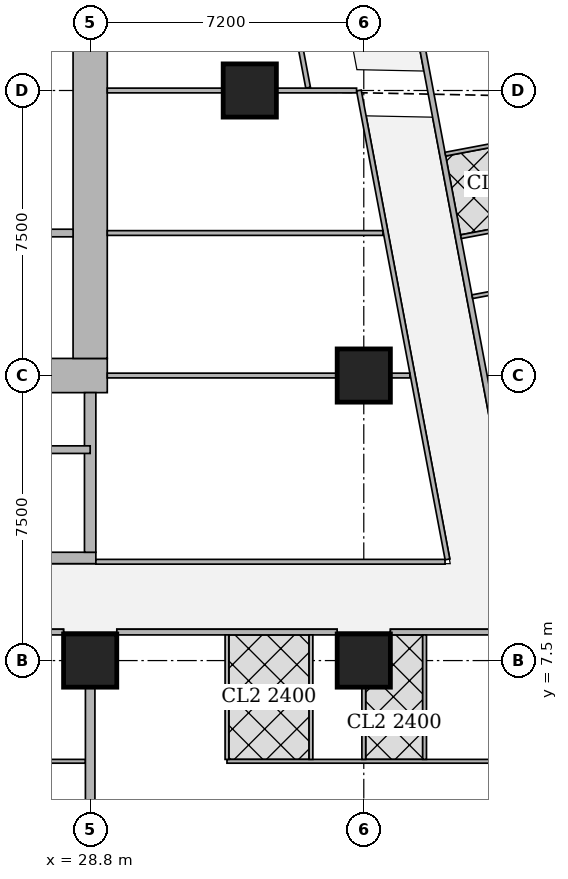
"""IFC4 building model, lengths in metres.
Left out: names, types, materials, properties, quantities, classifications, styles, units other than length and angle.
Written with IfcOpenShell. Run it as: python <this file> out.ifc"""

import sys

from ifc_helpers import new_model, si_unit, direction, frame, frame_2d, origin, origin_2d, place, context, subcontext, project, spatial, rectangle, extrude, element, fill, save


model = new_model("IFC4")
c1 = context("Model", 3, precision=1e-05, world=origin(), true_north=direction((0.0, 1.0)))
c2 = subcontext(c1, "Body", "Model", "MODEL_VIEW")
j1 = project(units=[si_unit("LENGTHUNIT", "METRE"), si_unit("PLANEANGLEUNIT", "RADIAN")], contexts=[c1])
p1 = place(None, origin())
s1 = spatial("IfcSite", under=j1, at=p1, CompositionType="ELEMENT")
p2 = place(p1, origin())
s2 = spatial("IfcBuilding", under=s1, at=p2, CompositionType="ELEMENT")
p3 = place(p2, frame((0.0, 0.0, 193.7)))
s3 = spatial("IfcBuildingStorey", under=s2, at=p3, CompositionType="ELEMENT", Elevation=193.7)
for number, where, z_axis, x_axis in (
    (1, (28.8, 7.5, 0.0), (0.0, 0.0, 1.0), (1.0, 0.0, 0.0)),
    (2, (36.0, 7.5, 0.0), (0.0, 0.0, 1.0), (1.0, 0.0, 0.0)),
    (3, (36.0, 15.0, 0.0), (0.0, 0.0, 1.0), (1.0, 0.0, 0.0)),
    (4, (33.0, 22.5, 0.0), (0.0, 0.0, 1.0), (1.0, 0.0, 0.0)),
):
    element("IfcColumn", number, at=place(p3, frame(where, z_axis=z_axis, x_axis=x_axis)), inside=s3, PredefinedType="COLUMN", context=c2, shape_type="SweptSolid", body=[
        extrude(rectangle(XDim=1.4, YDim=1.4, at=origin_2d()), origin(), (0.0, 0.0, 1.0), 3.75),
    ])
p4 = place(p3, frame((13.95, 15.0, 0.0), z_axis=(0.0, 0.0, 1.0), x_axis=(1.0, 0.0, 0.0)))
e5 = element("IfcWall", 5, at=p4, inside=s3, PredefinedType="SHEAR", context=c2, shape_type="SweptSolid", body=[
    extrude(rectangle(XDim=15.3, YDim=0.9, at=frame_2d((7.65, 0.0))), origin(), (0.0, 0.0, 1.0), 3.75),
])
p5 = place(p4, frame((4.45, 0.0, 0.0)))
e6 = element("IfcOpeningElement", 6, at=p5, cuts=e5, PredefinedType="OPENING", context=c2, shape_type="SweptSolid", body=[
    extrude(rectangle(XDim=1.8, YDim=2.1, at=frame_2d((0.9, 1.05))), frame((0.0, 0.46, 0.0), z_axis=(0.0, -1.0, 0.0), x_axis=(1.0, 0.0, 0.0)), (0.0, 0.0, 1.0), 0.92),
])
p6 = place(p4, frame((10.7, 0.0, 0.0)))
e7 = element("IfcOpeningElement", 7, at=p6, cuts=e5, PredefinedType="OPENING", context=c2, shape_type="SweptSolid", body=[
    extrude(rectangle(XDim=1.1, YDim=2.1, at=frame_2d((0.55, 1.05))), frame((0.0, 0.46, 0.0), z_axis=(0.0, -1.0, 0.0), x_axis=(1.0, 0.0, 0.0)), (0.0, 0.0, 1.0), 0.92),
])
p7 = place(p3, frame((28.8, 15.45, 0.0), z_axis=(0.0, 0.0, 1.0), x_axis=(0.0, 1.0, 0.0)))
e8 = element("IfcWall", 8, at=p7, inside=s3, PredefinedType="SHEAR", context=c2, shape_type="SweptSolid", body=[
    extrude(rectangle(XDim=14.1, YDim=0.9, at=frame_2d((7.05, 0.0))), origin(), (0.0, 0.0, 1.0), 3.75),
])
p8 = place(p3, frame((21.45, 10.2, 0.0), z_axis=(0.0, 0.0, 1.0), x_axis=(1.0, 0.0, 0.0)))
e9 = element("IfcWall", 9, at=p8, inside=s3, PredefinedType="SHEAR", context=c2, shape_type="SweptSolid", body=[
    extrude(rectangle(XDim=7.5, YDim=0.3, at=frame_2d((3.75, 0.0))), origin(), (0.0, 0.0, 1.0), 3.75),
])
p9 = place(p8, frame((0.5, 0.0, 0.0)))
e10 = element("IfcOpeningElement", 10, at=p9, cuts=e9, PredefinedType="OPENING", context=c2, shape_type="SweptSolid", body=[
    extrude(rectangle(XDim=1.1, YDim=2.1, at=frame_2d((0.55, 1.05))), frame((0.0, 0.16, 0.0), z_axis=(0.0, -1.0, 0.0), x_axis=(1.0, 0.0, 0.0)), (0.0, 0.0, 1.0), 0.32),
])
p10 = place(p3, frame((28.8, 10.35, 0.0), z_axis=(0.0, 0.0, 1.0), x_axis=(0.0, 1.0, 0.0)))
e11 = element("IfcWall", 11, at=p10, inside=s3, PredefinedType="SHEAR", context=c2, shape_type="SweptSolid", body=[
    extrude(rectangle(XDim=4.2, YDim=0.3, at=frame_2d((2.1, 0.0))), origin(), (0.0, 0.0, 1.0), 3.75),
])
p11 = place(p3, frame((40.355, 8.25, 0.0), z_axis=(0.0, 0.0, 1.0), x_axis=(-1.0, 0.0, 0.0)))
e12 = element("IfcWall", 12, at=p11, inside=s3, PredefinedType="SOLIDWALL", context=c2, shape_type="SweptSolid", body=[
    extrude(rectangle(XDim=3.654, YDim=0.15, at=frame_2d((1.827, 0.0))), origin(), (0.0, 0.0, 1.0), 3.5),
])
p12 = place(p3, frame((35.299, 8.25, 0.0), z_axis=(0.0, 0.0, 1.0), x_axis=(-1.0, 0.0, 0.0)))
e13 = element("IfcWall", 13, at=p12, inside=s3, PredefinedType="SOLIDWALL", context=c2, shape_type="SweptSolid", body=[
    extrude(rectangle(XDim=5.798, YDim=0.15, at=frame_2d((2.899, 0.0))), origin(), (0.0, 0.0, 1.0), 3.5),
])
p13 = place(p12, frame((3.999, 0.0, 0.0)))
e14 = element("IfcOpeningElement", 14, at=p13, cuts=e13, PredefinedType="OPENING", context=c2, shape_type="SweptSolid", body=[
    extrude(rectangle(XDim=1.0, YDim=2.1, at=frame_2d((0.5, 1.05))), frame((0.0, 0.085, 0.0), z_axis=(0.0, -1.0, 0.0), x_axis=(1.0, 0.0, 0.0)), (0.0, 0.0, 1.0), 0.17),
])
p14 = place(p3, frame((28.099, 8.25, 0.0), z_axis=(0.0, 0.0, 1.0), x_axis=(-1.0, 0.0, 0.0)))
e15 = element("IfcWall", 15, at=p14, inside=s3, PredefinedType="SOLIDWALL", context=c2, shape_type="SweptSolid", body=[
    extrude(rectangle(XDim=5.798, YDim=0.15, at=frame_2d((2.899, 0.0))), origin(), (0.0, 0.0, 1.0), 3.5),
])
p15 = place(p3, frame((33.933, 42.73, 0.0), z_axis=(0.0, 0.0, 1.0), x_axis=(0.185595417643, -0.982626246825, 0.0)))
e16 = element("IfcWall", 16, at=p15, inside=s3, PredefinedType="SOLIDWALL", context=c2, shape_type="SweptSolid", body=[
    extrude(rectangle(XDim=41.051, YDim=0.15, at=frame_2d((20.525, 0.0))), origin(), (0.0, 0.0, 1.0), 2.5),
])
p16 = place(p15, frame((16.082, 0.0, 0.0)))
e17 = element("IfcOpeningElement", 17, at=p16, cuts=e16, PredefinedType="OPENING", context=c2, shape_type="SweptSolid", body=[
    extrude(rectangle(XDim=1.0, YDim=2.1, at=frame_2d((0.5, 1.05))), frame((0.0, 0.085, 0.0), z_axis=(0.0, -1.0, 0.0), x_axis=(1.0, 0.0, 0.0)), (0.0, 0.0, 1.0), 0.17),
])
p17 = place(p15, frame((19.898, 0.0, 0.0)))
e18 = element("IfcOpeningElement", 18, at=p17, cuts=e16, PredefinedType="OPENING", context=c2, shape_type="SweptSolid", body=[
    extrude(rectangle(XDim=1.0, YDim=2.1, at=frame_2d((0.5, 1.05))), frame((0.0, 0.085, 0.0), z_axis=(0.0, -1.0, 0.0), x_axis=(1.0, 0.0, 0.0)), (0.0, 0.0, 1.0), 0.17),
])
p18 = place(p15, frame((30.862, 0.0, 0.0)))
e19 = element("IfcOpeningElement", 19, at=p18, cuts=e16, PredefinedType="OPENING", context=c2, shape_type="SweptSolid", body=[
    extrude(rectangle(XDim=1.0, YDim=2.1, at=frame_2d((0.5, 1.05))), frame((0.0, 0.085, 0.0), z_axis=(0.0, -1.0, 0.0), x_axis=(1.0, 0.0, 0.0)), (0.0, 0.0, 1.0), 0.17),
])
p19 = place(p3, frame((28.675, 4.85, 0.0), z_axis=(0.0, 0.0, 1.0), x_axis=(-1.0, 0.0, 0.0)))
e20 = element("IfcWall", 20, at=p19, inside=s3, PredefinedType="PARTITIONING", context=c2, shape_type="SweptSolid", body=[
    extrude(rectangle(XDim=10.675, YDim=0.1, at=frame_2d((5.337, 0.0))), origin(), (0.0, 0.0, 1.0), 3.5),
])
p20 = place(p19, frame((9.12, 0.0, 0.0)))
e21 = element("IfcOpeningElement", 21, at=p20, cuts=e20, PredefinedType="OPENING", context=c2, shape_type="SweptSolid", body=[
    extrude(rectangle(XDim=0.9, YDim=2.1, at=frame_2d((0.45, 1.05))), frame((0.0, 0.06, 0.0), z_axis=(0.0, -1.0, 0.0), x_axis=(1.0, 0.0, 0.0)), (0.0, 0.0, 1.0), 0.12),
])
p21 = place(p19, frame((5.825, 0.0, 0.0)))
e22 = element("IfcOpeningElement", 22, at=p21, cuts=e20, PredefinedType="OPENING", context=c2, shape_type="SweptSolid", body=[
    extrude(rectangle(XDim=0.9, YDim=2.1, at=frame_2d((0.45, 1.05))), frame((0.0, 0.06, 0.0), z_axis=(0.0, -1.0, 0.0), x_axis=(1.0, 0.0, 0.0)), (0.0, 0.0, 1.0), 0.12),
])
p22 = place(p19, frame((2.115, 0.0, 0.0)))
e23 = element("IfcOpeningElement", 23, at=p22, cuts=e20, PredefinedType="OPENING", context=c2, shape_type="SweptSolid", body=[
    extrude(rectangle(XDim=0.9, YDim=2.1, at=frame_2d((0.45, 1.05))), frame((0.0, 0.06, 0.0), z_axis=(0.0, -1.0, 0.0), x_axis=(1.0, 0.0, 0.0)), (0.0, 0.0, 1.0), 0.12),
])
p23 = place(p19, frame((7.32, 0.0, 0.0)))
e24 = element("IfcOpeningElement", 24, at=p23, cuts=e20, PredefinedType="OPENING", context=c2, shape_type="SweptSolid", body=[
    extrude(rectangle(XDim=0.9, YDim=2.1, at=frame_2d((0.45, 1.05))), frame((0.0, 0.06, 0.0), z_axis=(0.0, -1.0, 0.0), x_axis=(1.0, 0.0, 0.0)), (0.0, 0.0, 1.0), 0.12),
])
p24 = place(p19, frame((4.025, 0.0, 0.0)))
e25 = element("IfcOpeningElement", 25, at=p24, cuts=e20, PredefinedType="OPENING", context=c2, shape_type="SweptSolid", body=[
    extrude(rectangle(XDim=0.9, YDim=2.1, at=frame_2d((0.45, 1.05))), frame((0.0, 0.06, 0.0), z_axis=(0.0, -1.0, 0.0), x_axis=(1.0, 0.0, 0.0)), (0.0, 0.0, 1.0), 0.12),
])
p25 = place(p19, frame((0.315, 0.0, 0.0)))
e26 = element("IfcOpeningElement", 26, at=p25, cuts=e20, PredefinedType="OPENING", context=c2, shape_type="SweptSolid", body=[
    extrude(rectangle(XDim=0.9, YDim=2.1, at=frame_2d((0.45, 1.05))), frame((0.0, 0.06, 0.0), z_axis=(0.0, -1.0, 0.0), x_axis=(1.0, 0.0, 0.0)), (0.0, 0.0, 1.0), 0.12),
])
p26 = place(p3, frame((41.002, 4.85, 0.0), z_axis=(0.0, 0.0, 1.0), x_axis=(-1.0, 0.0, 0.0)))
e27 = element("IfcWall", 27, at=p26, inside=s3, PredefinedType="PARTITIONING", context=c2, shape_type="SweptSolid", body=[
    extrude(rectangle(XDim=8.602, YDim=0.1, at=frame_2d((4.301, 0.0))), origin(), (0.0, 0.0, 1.0), 3.5),
])
p27 = place(p26, frame((7.047, 0.0, 0.0)))
e28 = element("IfcOpeningElement", 28, at=p27, cuts=e27, PredefinedType="OPENING", context=c2, shape_type="SweptSolid", body=[
    extrude(rectangle(XDim=0.9, YDim=2.1, at=frame_2d((0.45, 1.05))), frame((0.0, 0.06, 0.0), z_axis=(0.0, -1.0, 0.0), x_axis=(1.0, 0.0, 0.0)), (0.0, 0.0, 1.0), 0.12),
])
p28 = place(p26, frame((3.752, 0.0, 0.0)))
e29 = element("IfcOpeningElement", 29, at=p28, cuts=e27, PredefinedType="OPENING", context=c2, shape_type="SweptSolid", body=[
    extrude(rectangle(XDim=0.9, YDim=2.1, at=frame_2d((0.45, 1.05))), frame((0.0, 0.06, 0.0), z_axis=(0.0, -1.0, 0.0), x_axis=(1.0, 0.0, 0.0)), (0.0, 0.0, 1.0), 0.12),
])
p29 = place(p26, frame((0.15, 0.0, 0.0)))
e30 = element("IfcOpeningElement", 30, at=p29, cuts=e27, PredefinedType="OPENING", context=c2, shape_type="SweptSolid", body=[
    extrude(rectangle(XDim=0.9, YDim=2.1, at=frame_2d((0.45, 1.05))), frame((0.0, 0.06, 0.0), z_axis=(0.0, -1.0, 0.0), x_axis=(1.0, 0.0, 0.0)), (0.0, 0.0, 1.0), 0.12),
])
p30 = place(p26, frame((5.247, 0.0, 0.0)))
e31 = element("IfcOpeningElement", 31, at=p30, cuts=e27, PredefinedType="OPENING", context=c2, shape_type="SweptSolid", body=[
    extrude(rectangle(XDim=0.9, YDim=2.1, at=frame_2d((0.45, 1.05))), frame((0.0, 0.06, 0.0), z_axis=(0.0, -1.0, 0.0), x_axis=(1.0, 0.0, 0.0)), (0.0, 0.0, 1.0), 0.12),
])
p31 = place(p26, frame((1.952, 0.0, 0.0)))
e32 = element("IfcOpeningElement", 32, at=p31, cuts=e27, PredefinedType="OPENING", context=c2, shape_type="SweptSolid", body=[
    extrude(rectangle(XDim=0.9, YDim=2.1, at=frame_2d((0.45, 1.05))), frame((0.0, 0.06, 0.0), z_axis=(0.0, -1.0, 0.0), x_axis=(1.0, 0.0, 0.0)), (0.0, 0.0, 1.0), 0.12),
])
p32 = place(p3, frame((32.4, 4.9, 0.0), z_axis=(0.0, 0.0, 1.0), x_axis=(0.0, 1.0, 0.0)))
e33 = element("IfcWall", 33, at=p32, inside=s3, PredefinedType="PARTITIONING", context=c2, shape_type="SweptSolid", body=[
    extrude(rectangle(XDim=3.275, YDim=0.1, at=frame_2d((1.638, 0.0))), origin(), (0.0, 0.0, 1.0), 3.5),
])
p33 = place(p3, frame((36.0, 4.9, 0.0), z_axis=(0.0, 0.0, 1.0), x_axis=(0.0, 1.0, 0.0)))
e34 = element("IfcWall", 34, at=p33, inside=s3, PredefinedType="PARTITIONING", context=c2, shape_type="SweptSolid", body=[
    extrude(rectangle(XDim=1.899, YDim=0.1, at=frame_2d((0.95, 0.0))), origin(), (0.0, 0.0, 1.0), 3.5),
])
for number, where, z_axis, x_axis in (
    (35, (34.61, 4.9, 0.0), (0.0, 0.0, 1.0), (0.0, 1.0, 0.0)),
    (36, (37.6, 4.9, 0.0), (0.0, 0.0, 1.0), (0.0, 1.0, 0.0)),
):
    element("IfcWall", number, at=place(p3, frame(where, z_axis=z_axis, x_axis=x_axis)), inside=s3, PredefinedType="PARTITIONING", context=c2, shape_type="SweptSolid", body=[
        extrude(rectangle(XDim=3.275, YDim=0.1, at=frame_2d((1.638, 0.0))), origin(), (0.0, 0.0, 1.0), 3.5),
    ])
p34 = place(p3, frame((28.8, 3.65, 0.0), z_axis=(0.0, 0.0, 1.0), x_axis=(0.0, 1.0, 0.0)))
e37 = element("IfcWall", 37, at=p34, inside=s3, PredefinedType="SOLIDWALL", context=c2, shape_type="SweptSolid", body=[
    extrude(rectangle(XDim=3.149, YDim=0.25, at=frame_2d((1.575, 0.0))), origin(), (0.0, 0.0, 1.0), 3.5),
])
p35 = place(p3, frame((41.365, 21.433, 0.0), z_axis=(0.0, 0.0, 1.0), x_axis=(-0.982607026909, -0.185697147715, 0.0)))
e38 = element("IfcWall", 38, at=p35, inside=s3, PredefinedType="PARTITIONING", context=c2, shape_type="SweptSolid", body=[
    extrude(rectangle(XDim=3.275, YDim=0.1, at=frame_2d((1.637, 0.0))), origin(), (0.0, 0.0, 1.0), 3.5),
])
p36 = place(p3, frame((42.073, 17.682, 0.0), z_axis=(0.0, 0.0, 1.0), x_axis=(-0.982620626894, -0.185625169636, 0.0)))
e39 = element("IfcWall", 39, at=p36, inside=s3, PredefinedType="PARTITIONING", context=c2, shape_type="SweptSolid", body=[
    extrude(rectangle(XDim=3.275, YDim=0.1, at=frame_2d((1.637, 0.0))), origin(), (0.0, 0.0, 1.0), 3.5),
])
p37 = place(p36, frame((1.2, 0.0, 0.0)))
e40 = element("IfcOpeningElement", 40, at=p37, cuts=e39, PredefinedType="OPENING", context=c2, shape_type="SweptSolid", body=[
    extrude(rectangle(XDim=0.9, YDim=2.1, at=frame_2d((0.45, 1.05))), frame((0.0, 0.06, 0.0), z_axis=(0.0, -1.0, 0.0), x_axis=(1.0, 0.0, 0.0)), (0.0, 0.0, 1.0), 0.12),
])
p38 = place(p3, frame((41.775, 19.261, 0.0), z_axis=(0.0, 0.0, 1.0), x_axis=(-0.982620626894, -0.185625169636, 0.0)))
e41 = element("IfcWall", 41, at=p38, inside=s3, PredefinedType="PARTITIONING", context=c2, shape_type="SweptSolid", body=[
    extrude(rectangle(XDim=3.275, YDim=0.1, at=frame_2d((1.637, 0.0))), origin(), (0.0, 0.0, 1.0), 3.5),
])
p39 = place(p3, frame((28.95, 10.1, 0.0), z_axis=(0.0, 0.0, 1.0), x_axis=(1.0, 0.0, 0.0)))
e42 = element("IfcWall", 42, at=p39, inside=s3, PredefinedType="PARTITIONING", context=c2, shape_type="SweptSolid", body=[
    extrude(rectangle(XDim=9.188, YDim=0.125, at=frame_2d((4.594, 0.0))), origin(), (0.0, 0.0, 1.0), 3.5),
])
p40 = place(p3, frame((38.202, 10.163, 0.0), z_axis=(0.0, 0.0, 1.0), x_axis=(-0.185645577403, 0.982616771479, 0.0)))
e43 = element("IfcWall", 43, at=p40, inside=s3, PredefinedType="PARTITIONING", context=c2, shape_type="SweptSolid", body=[
    extrude(rectangle(XDim=12.555, YDim=0.125, at=frame_2d((6.278, 0.0))), origin(), (0.0, 0.0, 1.0), 2.5),
])
p41 = place(p40, frame((0.708, 0.0, 0.0)))
e44 = element("IfcOpeningElement", 44, at=p41, cuts=e43, PredefinedType="OPENING", context=c2, shape_type="SweptSolid", body=[
    extrude(rectangle(XDim=1.0, YDim=2.1, at=frame_2d((0.5, 1.05))), frame((0.0, 0.073, 0.0), z_axis=(0.0, -1.0, 0.0), x_axis=(1.0, 0.0, 0.0)), (0.0, 0.0, 1.0), 0.145),
])
p42 = place(p40, frame((5.9, 0.0, 0.0)))
e45 = element("IfcOpeningElement", 45, at=p42, cuts=e43, PredefinedType="OPENING", context=c2, shape_type="SweptSolid", body=[
    extrude(rectangle(XDim=1.0, YDim=2.1, at=frame_2d((0.5, 1.05))), frame((0.0, 0.073, 0.0), z_axis=(0.0, -1.0, 0.0), x_axis=(1.0, 0.0, 0.0)), (0.0, 0.0, 1.0), 0.145),
])
p43 = place(p40, frame((9.562, 0.0, 0.0)))
e46 = element("IfcOpeningElement", 46, at=p43, cuts=e43, PredefinedType="OPENING", context=c2, shape_type="SweptSolid", body=[
    extrude(rectangle(XDim=1.0, YDim=2.1, at=frame_2d((0.5, 1.05))), frame((0.0, 0.073, 0.0), z_axis=(0.0, -1.0, 0.0), x_axis=(1.0, 0.0, 0.0)), (0.0, 0.0, 1.0), 0.145),
])
p44 = place(p3, frame((34.535, 22.574, 0.0), z_axis=(0.0, 0.0, 1.0), x_axis=(-0.185576487128, 0.982629822174, 0.0)))
e47 = element("IfcWall", 47, at=p44, inside=s3, PredefinedType="PARTITIONING", context=c2, shape_type="SweptSolid", body=[
    extrude(rectangle(XDim=6.832, YDim=0.125, at=frame_2d((3.416, 0.0))), origin(), (0.0, 0.0, 1.0), 2.5),
])
p45 = place(p44, frame((3.241, 0.0, 0.0)))
e48 = element("IfcOpeningElement", 48, at=p45, cuts=e47, PredefinedType="OPENING", context=c2, shape_type="SweptSolid", body=[
    extrude(rectangle(XDim=1.0, YDim=2.1, at=frame_2d((0.5, 1.05))), frame((0.0, 0.073, 0.0), z_axis=(0.0, -1.0, 0.0), x_axis=(1.0, 0.0, 0.0)), (0.0, 0.0, 1.0), 0.145),
])
p46 = place(p3, frame((29.25, 15.0, 0.0), z_axis=(0.0, 0.0, 1.0), x_axis=(1.0, 0.0, 0.0)))
e49 = element("IfcWall", 49, at=p46, inside=s3, PredefinedType="PARTITIONING", context=c2, shape_type="SweptSolid", body=[
    extrude(rectangle(XDim=6.049, YDim=0.125, at=frame_2d((3.024, 0.0))), origin(), (0.0, 0.0, 1.0), 3.5),
])
p47 = place(p3, frame((36.701, 15.0, 0.0), z_axis=(0.0, 0.0, 1.0), x_axis=(1.0, 0.0, 0.0)))
e50 = element("IfcWall", 50, at=p47, inside=s3, PredefinedType="PARTITIONING", context=c2, shape_type="SweptSolid", body=[
    extrude(rectangle(XDim=0.512, YDim=0.125, at=frame_2d((0.256, 0.0))), origin(), (0.0, 0.0, 1.0), 3.5),
])
p48 = place(p3, frame((29.25, 18.75, 0.0), z_axis=(0.0, 0.0, 1.0), x_axis=(1.0, 0.0, 0.0)))
e51 = element("IfcWall", 51, at=p48, inside=s3, PredefinedType="PARTITIONING", context=c2, shape_type="SweptSolid", body=[
    extrude(rectangle(XDim=7.254, YDim=0.125, at=frame_2d((3.627, 0.0))), origin(), (0.0, 0.0, 1.0), 3.5),
])
p49 = place(p3, frame((29.25, 22.5, 0.0), z_axis=(0.0, 0.0, 1.0), x_axis=(1.0, 0.0, 0.0)))
e52 = element("IfcWall", 52, at=p49, inside=s3, PredefinedType="PARTITIONING", context=c2, shape_type="SweptSolid", body=[
    extrude(rectangle(XDim=3.049, YDim=0.125, at=frame_2d((1.524, 0.0))), origin(), (0.0, 0.0, 1.0), 3.5),
])
p50 = place(p3, frame((33.701, 22.5, 0.0), z_axis=(0.0, 0.0, 1.0), x_axis=(1.0, 0.0, 0.0)))
e53 = element("IfcWall", 53, at=p50, inside=s3, PredefinedType="PARTITIONING", context=c2, shape_type="SweptSolid", body=[
    extrude(rectangle(XDim=2.109, YDim=0.125, at=frame_2d((1.055, 0.0))), origin(), (0.0, 0.0, 1.0), 2.5),
])
p51 = place(p3, frame((23.0, 13.05, 0.0), z_axis=(0.0, 0.0, 1.0), x_axis=(1.0, 0.0, 0.0)))
e54 = element("IfcWall", 54, at=p51, inside=s3, PredefinedType="SHEAR", context=c2, shape_type="SweptSolid", body=[
    extrude(rectangle(XDim=5.8, YDim=0.2, at=frame_2d((2.9, 0.0))), origin(), (0.0, 0.0, 1.0), 3.75),
])
p52 = place(p3, frame((27.4, 18.75, 0.0), z_axis=(0.0, 0.0, 1.0), x_axis=(1.0, 0.0, 0.0)))
e55 = element("IfcWall", 55, at=p52, inside=s3, PredefinedType="SOLIDWALL", context=c2, shape_type="SweptSolid", body=[
    extrude(rectangle(XDim=0.95, YDim=0.2, at=frame_2d((0.475, 0.0))), origin(), (0.0, 0.0, 1.0), 3.5),
])
p53 = place(p25, origin())
e56 = element("IfcDoor", 56, at=p53, inside=s3, OperationType="SINGLE_SWING_RIGHT", PredefinedType="DOOR", context=c2, shape_type="SweptSolid", body=[
    extrude(rectangle(XDim=0.9, YDim=2.1, at=frame_2d((0.45, 1.05))), frame((0.0, 0.025, 0.0), z_axis=(0.0, -1.0, 0.0), x_axis=(1.0, 0.0, 0.0)), (0.0, 0.0, 1.0), 0.05),
])
fill(e26, e56)
p54 = place(p27, origin())
e57 = element("IfcDoor", 57, at=p54, inside=s3, OperationType="SINGLE_SWING_LEFT", PredefinedType="DOOR", context=c2, shape_type="SweptSolid", body=[
    extrude(rectangle(XDim=0.9, YDim=2.1, at=frame_2d((0.45, 1.05))), frame((0.0, 0.025, 0.0), z_axis=(0.0, -1.0, 0.0), x_axis=(1.0, 0.0, 0.0)), (0.0, 0.0, 1.0), 0.05),
])
fill(e28, e57)
p55 = place(p28, origin())
e58 = element("IfcDoor", 58, at=p55, inside=s3, OperationType="SINGLE_SWING_LEFT", PredefinedType="DOOR", context=c2, shape_type="SweptSolid", body=[
    extrude(rectangle(XDim=0.9, YDim=2.1, at=frame_2d((0.45, 1.05))), frame((0.0, 0.025, 0.0), z_axis=(0.0, -1.0, 0.0), x_axis=(1.0, 0.0, 0.0)), (0.0, 0.0, 1.0), 0.05),
])
fill(e29, e58)
p56 = place(p30, origin())
e59 = element("IfcDoor", 59, at=p56, inside=s3, OperationType="SINGLE_SWING_RIGHT", PredefinedType="DOOR", context=c2, shape_type="SweptSolid", body=[
    extrude(rectangle(XDim=0.9, YDim=2.1, at=frame_2d((0.45, 1.05))), frame((0.0, 0.025, 0.0), z_axis=(0.0, -1.0, 0.0), x_axis=(1.0, 0.0, 0.0)), (0.0, 0.0, 1.0), 0.05),
])
fill(e31, e59)
p57 = place(p31, origin())
e60 = element("IfcDoor", 60, at=p57, inside=s3, OperationType="SINGLE_SWING_RIGHT", PredefinedType="DOOR", context=c2, shape_type="SweptSolid", body=[
    extrude(rectangle(XDim=0.9, YDim=2.1, at=frame_2d((0.45, 1.05))), frame((0.0, 0.025, 0.0), z_axis=(0.0, -1.0, 0.0), x_axis=(1.0, 0.0, 0.0)), (0.0, 0.0, 1.0), 0.05),
])
fill(e32, e60)
p58 = place(p13, origin())
e61 = element("IfcDoor", 61, at=p58, inside=s3, OperationType="SINGLE_SWING_RIGHT", PredefinedType="DOOR", context=c2, shape_type="SweptSolid", body=[
    extrude(rectangle(XDim=1.0, YDim=2.1, at=frame_2d((0.5, 1.05))), frame((0.0, 0.025, 0.0), z_axis=(0.0, -1.0, 0.0), x_axis=(1.0, 0.0, 0.0)), (0.0, 0.0, 1.0), 0.05),
])
fill(e14, e61)
p59 = place(p17, origin())
e62 = element("IfcDoor", 62, at=p59, inside=s3, OperationType="SINGLE_SWING_RIGHT", PredefinedType="DOOR", context=c2, shape_type="SweptSolid", body=[
    extrude(rectangle(XDim=1.0, YDim=2.1, at=frame_2d((0.5, 1.05))), frame((0.0, 0.025, 0.0), z_axis=(0.0, -1.0, 0.0), x_axis=(1.0, 0.0, 0.0)), (0.0, 0.0, 1.0), 0.05),
])
fill(e18, e62)
p60 = place(p41, origin())
e63 = element("IfcDoor", 63, at=p60, inside=s3, OperationType="SINGLE_SWING_LEFT", PredefinedType="DOOR", context=c2, shape_type="SweptSolid", body=[
    extrude(rectangle(XDim=1.0, YDim=2.1, at=frame_2d((0.5, 1.05))), frame((0.0, 0.025, 0.0), z_axis=(0.0, -1.0, 0.0), x_axis=(1.0, 0.0, 0.0)), (0.0, 0.0, 1.0), 0.05),
])
fill(e44, e63)
p61 = place(p42, origin())
e64 = element("IfcDoor", 64, at=p61, inside=s3, OperationType="SINGLE_SWING_LEFT", PredefinedType="DOOR", context=c2, shape_type="SweptSolid", body=[
    extrude(rectangle(XDim=1.0, YDim=2.1, at=frame_2d((0.5, 1.05))), frame((0.0, 0.025, 0.0), z_axis=(0.0, -1.0, 0.0), x_axis=(1.0, 0.0, 0.0)), (0.0, 0.0, 1.0), 0.05),
])
fill(e45, e64)
p62 = place(p43, origin())
e65 = element("IfcDoor", 65, at=p62, inside=s3, OperationType="SINGLE_SWING_LEFT", PredefinedType="DOOR", context=c2, shape_type="SweptSolid", body=[
    extrude(rectangle(XDim=1.0, YDim=2.1, at=frame_2d((0.5, 1.05))), frame((0.0, 0.025, 0.0), z_axis=(0.0, -1.0, 0.0), x_axis=(1.0, 0.0, 0.0)), (0.0, 0.0, 1.0), 0.05),
])
fill(e46, e65)
save(model, sys.argv[1])
